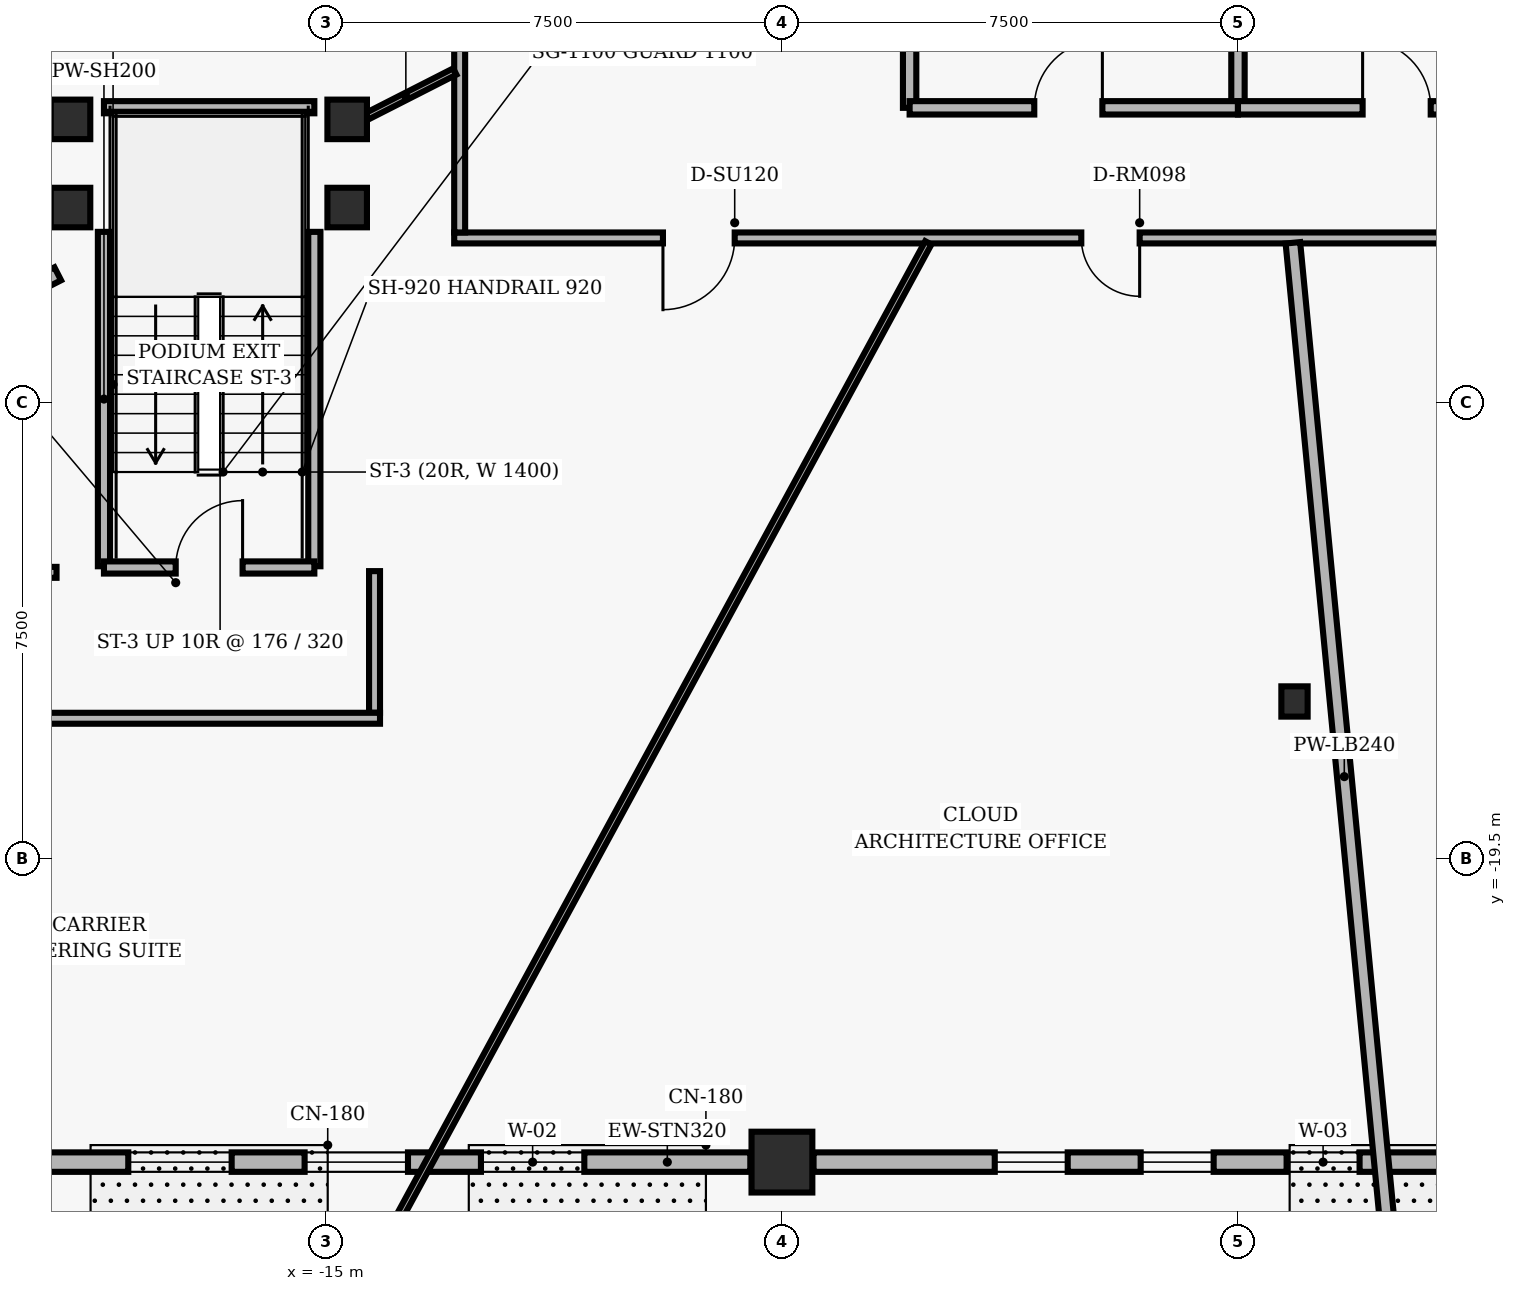
"""IFC4 building model, lengths in metres.
Left out: names, types, materials, properties, quantities, classifications, styles, units other than length and angle.
Written with IfcOpenShell. Run it as: python <this file> out.ifc"""

import sys

from ifc_helpers import new_model, si_unit, direction, frame, frame_2d, origin, origin_2d, place, context, subcontext, project, spatial, rectangle, i_section, extrude, element, fill, save


model = new_model("IFC4")
c1 = context("Model", 3, precision=1e-05, world=origin(), true_north=direction((0.0, 1.0)))
c2 = subcontext(c1, "Body", "Model", "MODEL_VIEW")
j1 = project(units=[si_unit("LENGTHUNIT", "METRE"), si_unit("PLANEANGLEUNIT", "RADIAN")], contexts=[c1])
p1 = place(None, origin())
s1 = spatial("IfcSite", under=j1, at=p1, CompositionType="ELEMENT")
p2 = place(p1, origin())
s2 = spatial("IfcBuilding", under=s1, at=p2, CompositionType="ELEMENT")
p3 = place(p2, frame((0.0, 0.0, 4.8)))
s3 = spatial("IfcBuildingStorey", under=s2, at=p3, CompositionType="ELEMENT", Elevation=4.8)
p4 = place(p3, frame((-7.5, -24.5, 0.0), z_axis=(0.0, 0.0, 1.0), x_axis=(1.0, 0.0, 0.0)))
e1 = element("IfcColumn", 1, at=p4, inside=s3, PredefinedType="COLUMN", context=c2, shape_type="SweptSolid", body=[
    extrude(rectangle(XDim=1.0, YDim=1.0, at=origin_2d()), origin(), (0.0, 0.0, 1.0), 3.52),
])
for number, where, z_axis, x_axis in (
    (2, (-19.2, -8.8, 0.0), (0.0, 0.0, 1.0), (1.0, 0.0, 0.0)),
    (3, (-14.65, -8.8, 0.0), (0.0, 0.0, 1.0), (1.0, 0.0, 0.0)),
    (4, (-19.2, -7.35, 0.0), (0.0, 0.0, 1.0), (1.0, 0.0, 0.0)),
    (5, (-14.65, -7.35, 0.0), (0.0, 0.0, 1.0), (1.0, 0.0, 0.0)),
):
    element("IfcColumn", number, at=place(p3, frame(where, z_axis=z_axis, x_axis=x_axis)), inside=s3, PredefinedType="COLUMN", context=c2, shape_type="SweptSolid", body=[
        extrude(rectangle(XDim=0.65, YDim=0.65, at=origin_2d()), origin(), (0.0, 0.0, 1.0), 3.52),
    ])
p5 = place(p3, frame((0.93, -16.924, 0.0), z_axis=(0.0, 0.0, 1.0), x_axis=(1.0, 0.0, 0.0)))
e6 = element("IfcColumn", 6, at=p5, inside=s3, PredefinedType="COLUMN", context=c2, shape_type="SweptSolid", body=[
    extrude(i_section(OverallWidth=0.432, OverallDepth=0.498, WebThickness=0.056, FlangeThickness=0.089, FilletRadius=0.025, at=origin_2d()), origin(), (0.0, 0.0, 1.0), 3.52),
])
p6 = place(p3, frame((-8.02, -24.5, 0.0), z_axis=(0.0, 0.0, 1.0), x_axis=(-1.0, 0.0, 0.0)))
e7 = element("IfcWall", 7, at=p6, inside=s3, PredefinedType="SOLIDWALL", context=c2, shape_type="SweptSolid", body=[
    extrude(rectangle(XDim=12.96, YDim=0.32, at=frame_2d((6.48, 0.0))), origin(), (0.0, 0.0, 1.0), 2.588),
])
p7 = place(p6, frame((2.73, 0.0, 0.65)))
e8 = element("IfcOpeningElement", 8, at=p7, cuts=e7, PredefinedType="OPENING", context=c2, shape_type="SweptSolid", body=[
    extrude(rectangle(XDim=1.7, YDim=1.5, at=frame_2d((0.85, 0.75))), frame((0.0, 0.17, 0.0), z_axis=(0.0, -1.0, 0.0), x_axis=(1.0, 0.0, 0.0)), (0.0, 0.0, 1.0), 0.34),
])
p8 = place(p6, frame((5.63, 0.0, 0.65)))
e9 = element("IfcOpeningElement", 9, at=p8, cuts=e7, PredefinedType="OPENING", context=c2, shape_type="SweptSolid", body=[
    extrude(rectangle(XDim=1.7, YDim=1.5, at=frame_2d((0.85, 0.75))), frame((0.0, 0.17, 0.0), z_axis=(0.0, -1.0, 0.0), x_axis=(1.0, 0.0, 0.0)), (0.0, 0.0, 1.0), 0.34),
])
p9 = place(p6, frame((8.53, 0.0, 0.65)))
e10 = element("IfcOpeningElement", 10, at=p9, cuts=e7, PredefinedType="OPENING", context=c2, shape_type="SweptSolid", body=[
    extrude(rectangle(XDim=1.7, YDim=1.5, at=frame_2d((0.85, 0.75))), frame((0.0, 0.17, 0.0), z_axis=(0.0, -1.0, 0.0), x_axis=(1.0, 0.0, 0.0)), (0.0, 0.0, 1.0), 0.34),
])
p10 = place(p3, frame((4.98, -24.5, 0.0), z_axis=(0.0, 0.0, 1.0), x_axis=(-1.0, 0.0, 0.0)))
e11 = element("IfcWall", 11, at=p10, inside=s3, PredefinedType="SOLIDWALL", context=c2, shape_type="SweptSolid", body=[
    extrude(rectangle(XDim=11.96, YDim=0.32, at=frame_2d((5.98, 0.0))), origin(), (0.0, 0.0, 1.0), 2.588),
])
p11 = place(p10, frame((2.98, 0.0, 0.65)))
e12 = element("IfcOpeningElement", 12, at=p11, cuts=e11, PredefinedType="OPENING", context=c2, shape_type="SweptSolid", body=[
    extrude(rectangle(XDim=1.2, YDim=1.6, at=frame_2d((0.6, 0.8))), frame((0.0, 0.17, 0.0), z_axis=(0.0, -1.0, 0.0), x_axis=(1.0, 0.0, 0.0)), (0.0, 0.0, 1.0), 0.34),
])
p12 = place(p10, frame((5.38, 0.0, 0.65)))
e13 = element("IfcOpeningElement", 13, at=p12, cuts=e11, PredefinedType="OPENING", context=c2, shape_type="SweptSolid", body=[
    extrude(rectangle(XDim=1.2, YDim=1.6, at=frame_2d((0.6, 0.8))), frame((0.0, 0.17, 0.0), z_axis=(0.0, -1.0, 0.0), x_axis=(1.0, 0.0, 0.0)), (0.0, 0.0, 1.0), 0.34),
])
p13 = place(p10, frame((7.78, 0.0, 0.65)))
e14 = element("IfcOpeningElement", 14, at=p13, cuts=e11, PredefinedType="OPENING", context=c2, shape_type="SweptSolid", body=[
    extrude(rectangle(XDim=1.2, YDim=1.6, at=frame_2d((0.6, 0.8))), frame((0.0, 0.17, 0.0), z_axis=(0.0, -1.0, 0.0), x_axis=(1.0, 0.0, 0.0)), (0.0, 0.0, 1.0), 0.34),
])
p14 = place(p3, frame((-5.4, -7.16, 0.0), z_axis=(0.0, 0.0, 1.0), x_axis=(0.0, 1.0, 0.0)))
e15 = element("IfcWall", 15, at=p14, inside=s3, PredefinedType="PARTITIONING", context=c2, shape_type="SweptSolid", body=[
    extrude(rectangle(XDim=2.71, YDim=0.22, at=frame_2d((1.355, 0.0))), origin(), (0.0, 0.0, 1.0), 3.193),
])
p15 = place(p3, frame((0.0, -7.16, 0.0), z_axis=(0.0, 0.0, 1.0), x_axis=(0.0, 1.0, 0.0)))
e16 = element("IfcWall", 16, at=p15, inside=s3, PredefinedType="PARTITIONING", context=c2, shape_type="SweptSolid", body=[
    extrude(rectangle(XDim=2.81, YDim=0.22, at=frame_2d((1.405, 0.0))), origin(), (0.0, 0.0, 1.0), 3.193),
])
p16 = place(p3, frame((-5.4, -7.16, 0.0), z_axis=(0.0, 0.0, 1.0), x_axis=(1.0, 0.0, 0.0)))
e17 = element("IfcWall", 17, at=p16, inside=s3, PredefinedType="PARTITIONING", context=c2, shape_type="SweptSolid", body=[
    extrude(rectangle(XDim=5.4, YDim=0.22, at=frame_2d((2.7, 0.0))), origin(), (0.0, 0.0, 1.0), 3.193),
])
p17 = place(p16, frame((2.05, 0.0, 0.0)))
e18 = element("IfcOpeningElement", 18, at=p17, cuts=e17, PredefinedType="OPENING", context=c2, shape_type="SweptSolid", body=[
    extrude(rectangle(XDim=1.12, YDim=2.02, at=frame_2d((0.56, 1.01))), frame((0.0, 0.12, 0.0), z_axis=(0.0, -1.0, 0.0), x_axis=(1.0, 0.0, 0.0)), (0.0, 0.0, 1.0), 0.24),
])
p18 = place(p3, frame((0.0, -7.16, 0.0), z_axis=(0.0, 0.0, 1.0), x_axis=(1.0, 0.0, 0.0)))
e19 = element("IfcWall", 19, at=p18, inside=s3, PredefinedType="PARTITIONING", context=c2, shape_type="SweptSolid", body=[
    extrude(rectangle(XDim=5.4, YDim=0.22, at=frame_2d((2.7, 0.0))), origin(), (0.0, 0.0, 1.0), 3.193),
])
p19 = place(p18, frame((2.05, 0.0, 0.0)))
e20 = element("IfcOpeningElement", 20, at=p19, cuts=e19, PredefinedType="OPENING", context=c2, shape_type="SweptSolid", body=[
    extrude(rectangle(XDim=1.12, YDim=2.02, at=frame_2d((0.56, 1.01))), frame((0.0, 0.12, 0.0), z_axis=(0.0, -1.0, 0.0), x_axis=(1.0, 0.0, 0.0)), (0.0, 0.0, 1.0), 0.24),
])
for number, where, z_axis, x_axis in (
    (21, (-18.65, -14.7, 0.0), (0.0, 0.0, 1.0), (0.0, 1.0, 0.0)),
    (22, (-15.19, -14.7, 0.0), (0.0, 0.0, 1.0), (0.0, 1.0, 0.0)),
):
    element("IfcWall", number, at=place(p3, frame(where, z_axis=z_axis, x_axis=x_axis)), inside=s3, PredefinedType="PARTITIONING", context=c2, shape_type="SweptSolid", body=[
        extrude(rectangle(XDim=5.5, YDim=0.2, at=frame_2d((2.75, 0.0))), origin(), (0.0, 0.0, 1.0), 3.193),
    ])
p20 = place(p3, frame((-18.65, -7.15, 0.0), z_axis=(0.0, 0.0, 1.0), x_axis=(1.0, 0.0, 0.0)))
e23 = element("IfcWall", 23, at=p20, inside=s3, PredefinedType="PARTITIONING", context=c2, shape_type="SweptSolid", body=[
    extrude(rectangle(XDim=3.46, YDim=0.2, at=frame_2d((1.73, 0.0))), origin(), (0.0, 0.0, 1.0), 1.3),
])
p21 = place(p3, frame((-18.65, -14.72, 0.0), z_axis=(0.0, 0.0, 1.0), x_axis=(1.0, 0.0, 0.0)))
e24 = element("IfcWall", 24, at=p21, inside=s3, PredefinedType="PARTITIONING", context=c2, shape_type="SweptSolid", body=[
    extrude(rectangle(XDim=3.46, YDim=0.2, at=frame_2d((1.73, 0.0))), origin(), (0.0, 0.0, 1.0), 3.193),
])
p22 = place(p21, frame((1.18, 0.0, 0.0)))
e25 = element("IfcOpeningElement", 25, at=p22, cuts=e24, PredefinedType="OPENING", context=c2, shape_type="SweptSolid", body=[
    extrude(rectangle(XDim=1.1, YDim=2.04, at=frame_2d((0.55, 1.02))), frame((0.0, 0.11, 0.0), z_axis=(0.0, -1.0, 0.0), x_axis=(1.0, 0.0, 0.0)), (0.0, 0.0, 1.0), 0.22),
])
p23 = place(p3, frame((12.89, -9.3, 0.0), z_axis=(0.0, 0.0, 1.0), x_axis=(-1.0, 0.0, 0.0)))
e26 = element("IfcWall", 26, at=p23, inside=s3, PredefinedType="PARTITIONING", context=c2, shape_type="SweptSolid", body=[
    extrude(rectangle(XDim=25.78, YDim=0.18, at=frame_2d((12.89, 0.0))), origin(), (0.0, 0.0, 1.0), 2.76),
])
p24 = place(p23, frame((21.167, 0.0, 0.0)))
e27 = element("IfcOpeningElement", 27, at=p24, cuts=e26, PredefinedType="OPENING", context=c2, shape_type="SweptSolid", body=[
    extrude(rectangle(XDim=1.18, YDim=2.02, at=frame_2d((0.59, 1.01))), frame((0.0, 0.1, 0.0), z_axis=(0.0, -1.0, 0.0), x_axis=(1.0, 0.0, 0.0)), (0.0, 0.0, 1.0), 0.2),
])
p25 = place(p23, frame((14.507, 0.0, 0.0)))
e28 = element("IfcOpeningElement", 28, at=p25, cuts=e26, PredefinedType="OPENING", context=c2, shape_type="SweptSolid", body=[
    extrude(rectangle(XDim=0.96, YDim=2.02, at=frame_2d((0.48, 1.01))), frame((0.0, 0.1, 0.0), z_axis=(0.0, -1.0, 0.0), x_axis=(1.0, 0.0, 0.0)), (0.0, 0.0, 1.0), 0.2),
])
p26 = place(p23, frame((8.119, 0.0, 0.0)))
e29 = element("IfcOpeningElement", 29, at=p26, cuts=e26, PredefinedType="OPENING", context=c2, shape_type="SweptSolid", body=[
    extrude(rectangle(XDim=1.02, YDim=2.02, at=frame_2d((0.51, 1.01))), frame((0.0, 0.1, 0.0), z_axis=(0.0, -1.0, 0.0), x_axis=(1.0, 0.0, 0.0)), (0.0, 0.0, 1.0), 0.2),
])
p27 = place(p3, frame((-12.8, -9.21, 0.0), z_axis=(0.0, 0.0, 1.0), x_axis=(0.0, 1.0, 0.0)))
e30 = element("IfcWall", 30, at=p27, inside=s3, PredefinedType="PARTITIONING", context=c2, shape_type="SweptSolid", body=[
    extrude(rectangle(XDim=3.02, YDim=0.18, at=frame_2d((1.51, 0.0))), origin(), (0.0, 0.0, 1.0), 3.193),
])
p28 = place(p3, frame((-20.14, -14.8, 0.0), z_axis=(0.0, 0.0, 1.0), x_axis=(1.0, 0.0, 0.0)))
e31 = element("IfcWall", 31, at=p28, inside=s3, PredefinedType="PARTITIONING", context=c2, shape_type="SweptSolid", body=[
    extrude(rectangle(XDim=0.71, YDim=0.18, at=frame_2d((0.355, 0.0))), origin(), (0.0, 0.0, 1.0), 3.193),
])
p29 = place(p3, frame((-14.2, -14.78, 0.0), z_axis=(0.0, 0.0, 1.0), x_axis=(0.0, -1.0, 0.0)))
e32 = element("IfcWall", 32, at=p29, inside=s3, PredefinedType="PARTITIONING", context=c2, shape_type="SweptSolid", body=[
    extrude(rectangle(XDim=2.33, YDim=0.18, at=frame_2d((1.165, 0.0))), origin(), (0.0, 0.0, 1.0), 3.193),
])
p30 = place(p3, frame((-14.11, -17.2, 0.0), z_axis=(0.0, 0.0, 1.0), x_axis=(-1.0, 0.0, 0.0)))
e33 = element("IfcWall", 33, at=p30, inside=s3, PredefinedType="PARTITIONING", context=c2, shape_type="SweptSolid", body=[
    extrude(rectangle(XDim=5.96, YDim=0.18, at=frame_2d((2.98, 0.0))), origin(), (0.0, 0.0, 1.0), 3.193),
])
p31 = place(p3, frame((-12.88, -6.563, 0.0), z_axis=(0.0, 0.0, 1.0), x_axis=(-0.891024030563, -0.453956139908, 0.0)))
e34 = element("IfcWall", 34, at=p31, inside=s3, PredefinedType="MOVABLE", context=c2, shape_type="SweptSolid", body=[
    extrude(rectangle(XDim=1.807, YDim=0.115, at=frame_2d((0.904, 0.0))), origin(), (0.0, 0.0, 1.0), 3.193),
])
p32 = place(p3, frame((-19.41, -9.89, 0.0), z_axis=(0.0, 0.0, 1.0), x_axis=(-0.890983173506, -0.454036325121, 0.0)))
e35 = element("IfcWall", 35, at=p32, inside=s3, PredefinedType="PARTITIONING", context=c2, shape_type="SweptSolid", body=[
    extrude(rectangle(XDim=0.629, YDim=0.24, at=frame_2d((0.314, 0.0))), origin(), (0.0, 0.0, 1.0), 3.193),
])
p33 = place(p3, frame((-5.093, -9.38, 0.0), z_axis=(0.0, 0.0, 1.0), x_axis=(-0.477152799659, -0.878820348978, 0.0)))
e36 = element("IfcWall", 36, at=p33, inside=s3, PredefinedType="MOVABLE", context=c2, shape_type="SweptSolid", body=[
    extrude(rectangle(XDim=19.981, YDim=0.115, at=frame_2d((9.991, 0.0))), origin(), (0.0, 0.0, 1.0), 3.193),
])
p34 = place(p3, frame((0.903, -9.38, 0.0), z_axis=(0.0, 0.0, 1.0), x_axis=(0.095836344943, -0.995397104169, 0.0)))
e37 = element("IfcWall", 37, at=p34, inside=s3, PredefinedType="PARTITIONING", context=c2, shape_type="SweptSolid", body=[
    extrude(rectangle(XDim=17.641, YDim=0.24, at=frame_2d((8.821, 0.0))), origin(), (0.0, 0.0, 1.0), 3.193),
])
p35 = place(p7, origin())
e38 = element("IfcWindow", 38, at=p35, inside=s3, PartitioningType="SINGLE_PANEL", PredefinedType="WINDOW", context=c2, shape_type="SweptSolid", body=[
    extrude(rectangle(XDim=1.7, YDim=1.5, at=frame_2d((0.85, 0.75))), frame((0.0, 0.03, 0.0), z_axis=(0.0, -1.0, 0.0), x_axis=(1.0, 0.0, 0.0)), (0.0, 0.0, 1.0), 0.06),
])
fill(e8, e38)
p36 = place(p8, origin())
e39 = element("IfcWindow", 39, at=p36, inside=s3, PartitioningType="SINGLE_PANEL", PredefinedType="WINDOW", context=c2, shape_type="SweptSolid", body=[
    extrude(rectangle(XDim=1.7, YDim=1.5, at=frame_2d((0.85, 0.75))), frame((0.0, 0.03, 0.0), z_axis=(0.0, -1.0, 0.0), x_axis=(1.0, 0.0, 0.0)), (0.0, 0.0, 1.0), 0.06),
])
fill(e9, e39)
p37 = place(p9, origin())
e40 = element("IfcWindow", 40, at=p37, inside=s3, PartitioningType="SINGLE_PANEL", PredefinedType="WINDOW", context=c2, shape_type="SweptSolid", body=[
    extrude(rectangle(XDim=1.7, YDim=1.5, at=frame_2d((0.85, 0.75))), frame((0.0, 0.03, 0.0), z_axis=(0.0, -1.0, 0.0), x_axis=(1.0, 0.0, 0.0)), (0.0, 0.0, 1.0), 0.06),
])
fill(e10, e40)
p38 = place(p11, origin())
e41 = element("IfcWindow", 41, at=p38, inside=s3, PartitioningType="SINGLE_PANEL", PredefinedType="WINDOW", context=c2, shape_type="SweptSolid", body=[
    extrude(rectangle(XDim=1.2, YDim=1.6, at=frame_2d((0.6, 0.8))), frame((0.0, 0.03, 0.0), z_axis=(0.0, -1.0, 0.0), x_axis=(1.0, 0.0, 0.0)), (0.0, 0.0, 1.0), 0.06),
])
fill(e12, e41)
p39 = place(p12, origin())
e42 = element("IfcWindow", 42, at=p39, inside=s3, PartitioningType="SINGLE_PANEL", PredefinedType="WINDOW", context=c2, shape_type="SweptSolid", body=[
    extrude(rectangle(XDim=1.2, YDim=1.6, at=frame_2d((0.6, 0.8))), frame((0.0, 0.03, 0.0), z_axis=(0.0, -1.0, 0.0), x_axis=(1.0, 0.0, 0.0)), (0.0, 0.0, 1.0), 0.06),
])
fill(e13, e42)
p40 = place(p13, origin())
e43 = element("IfcWindow", 43, at=p40, inside=s3, PartitioningType="SINGLE_PANEL", PredefinedType="WINDOW", context=c2, shape_type="SweptSolid", body=[
    extrude(rectangle(XDim=1.2, YDim=1.6, at=frame_2d((0.6, 0.8))), frame((0.0, 0.03, 0.0), z_axis=(0.0, -1.0, 0.0), x_axis=(1.0, 0.0, 0.0)), (0.0, 0.0, 1.0), 0.06),
])
fill(e14, e43)
p41 = place(p17, origin())
e44 = element("IfcDoor", 44, at=p41, inside=s3, OperationType="SINGLE_SWING_RIGHT", PredefinedType="DOOR", context=c2, shape_type="SweptSolid", body=[
    extrude(rectangle(XDim=1.12, YDim=2.02, at=frame_2d((0.56, 1.01))), frame((0.0, 0.025, 0.0), z_axis=(0.0, -1.0, 0.0), x_axis=(1.0, 0.0, 0.0)), (0.0, 0.0, 1.0), 0.05),
])
fill(e18, e44)
p42 = place(p19, origin())
e45 = element("IfcDoor", 45, at=p42, inside=s3, OperationType="SINGLE_SWING_LEFT", PredefinedType="DOOR", context=c2, shape_type="SweptSolid", body=[
    extrude(rectangle(XDim=1.12, YDim=2.02, at=frame_2d((0.56, 1.01))), frame((0.0, 0.025, 0.0), z_axis=(0.0, -1.0, 0.0), x_axis=(1.0, 0.0, 0.0)), (0.0, 0.0, 1.0), 0.05),
])
fill(e20, e45)
p43 = place(p22, origin())
e46 = element("IfcDoor", 46, at=p43, inside=s3, OperationType="SINGLE_SWING_RIGHT", PredefinedType="DOOR", context=c2, shape_type="SweptSolid", body=[
    extrude(rectangle(XDim=1.1, YDim=2.04, at=frame_2d((0.55, 1.02))), frame((0.0, 0.025, 0.0), z_axis=(0.0, -1.0, 0.0), x_axis=(1.0, 0.0, 0.0)), (0.0, 0.0, 1.0), 0.05),
])
fill(e25, e46)
p44 = place(p24, origin())
e47 = element("IfcDoor", 47, at=p44, inside=s3, OperationType="SINGLE_SWING_RIGHT", PredefinedType="DOOR", context=c2, shape_type="SweptSolid", body=[
    extrude(rectangle(XDim=1.18, YDim=2.02, at=frame_2d((0.59, 1.01))), frame((0.0, 0.025, 0.0), z_axis=(0.0, -1.0, 0.0), x_axis=(1.0, 0.0, 0.0)), (0.0, 0.0, 1.0), 0.05),
])
fill(e27, e47)
p45 = place(p25, origin())
e48 = element("IfcDoor", 48, at=p45, inside=s3, OperationType="SINGLE_SWING_LEFT", PredefinedType="DOOR", context=c2, shape_type="SweptSolid", body=[
    extrude(rectangle(XDim=0.96, YDim=2.02, at=frame_2d((0.48, 1.01))), frame((0.0, 0.025, 0.0), z_axis=(0.0, -1.0, 0.0), x_axis=(1.0, 0.0, 0.0)), (0.0, 0.0, 1.0), 0.05),
])
fill(e28, e48)
save(model, sys.argv[1])
